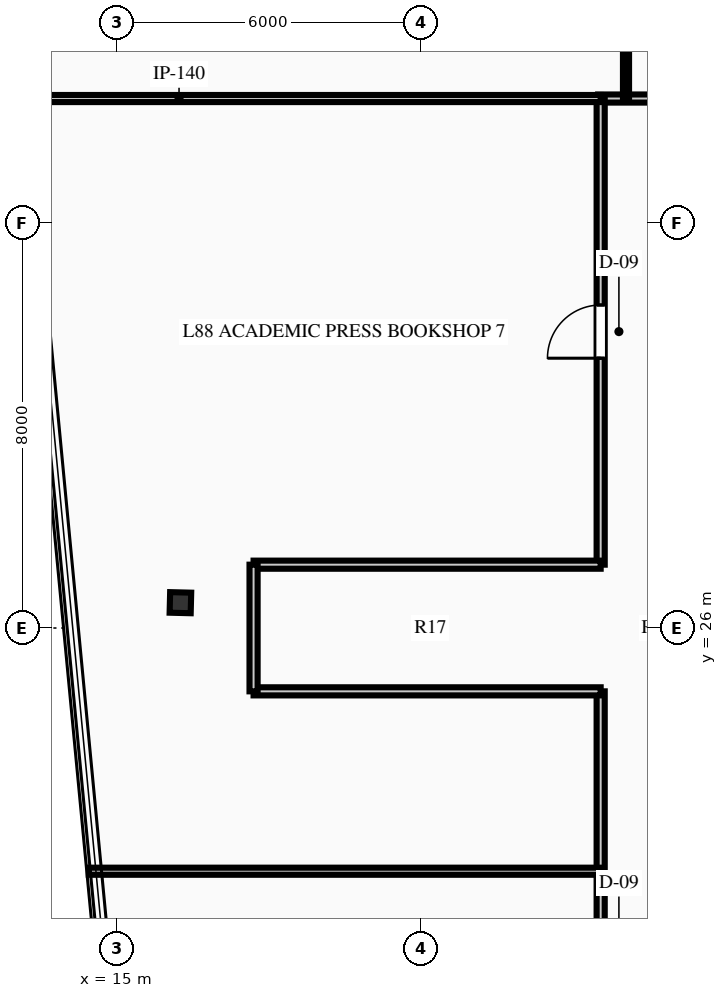
"""IFC4 building model, lengths in metres.
Left out: names, types, materials, properties, quantities, classifications, styles, units other than length and angle.
Written with IfcOpenShell. Run it as: python <this file> out.ifc"""

import sys

from ifc_helpers import new_model, si_unit, direction, frame, frame_2d, origin, origin_2d, place, context, subcontext, project, spatial, rectangle, i_section, extrude, element, fill, save


model = new_model("IFC4")
c1 = context("Model", 3, precision=1e-05, world=origin(), true_north=direction((0.0, 1.0)))
c2 = subcontext(c1, "Body", "Model", "MODEL_VIEW")
j1 = project(units=[si_unit("LENGTHUNIT", "METRE"), si_unit("PLANEANGLEUNIT", "RADIAN")], contexts=[c1])
p1 = place(None, origin())
s1 = spatial("IfcSite", under=j1, at=p1, CompositionType="ELEMENT")
p2 = place(p1, origin())
s2 = spatial("IfcBuilding", under=s1, at=p2, CompositionType="ELEMENT")
p3 = place(p2, frame((0.0, 0.0, 347.7)))
s3 = spatial("IfcBuildingStorey", under=s2, at=p3, CompositionType="ELEMENT", Elevation=347.7)
p4 = place(p3, frame((16.256, 26.5, 0.0), z_axis=(0.0, 0.0, 1.0), x_axis=(0.025304572866, 0.999679788028, 0.0)))
e1 = element("IfcColumn", 1, at=p4, inside=s3, PredefinedType="COLUMN", context=c2, shape_type="SweptSolid", body=[
    extrude(i_section(OverallWidth=0.406, OverallDepth=0.416, WebThickness=0.03, FlangeThickness=0.048, at=origin_2d()), origin(), (0.0, 0.0, 1.0), 4.5),
])
p5 = place(p3, frame((24.5, 36.45, 0.0), z_axis=(0.0, 0.0, 1.0), x_axis=(1.0, 0.0, 0.0)))
e2 = element("IfcWall", 2, at=p5, inside=s3, PredefinedType="PARTITIONING", context=c2, shape_type="SweptSolid", body=[
    extrude(rectangle(XDim=10.25, YDim=0.16, at=frame_2d((5.125, 0.0))), origin(), (0.0, 0.0, 1.0), 4.1),
])
p6 = place(p5, frame((1.25, 0.0, 0.0)))
e3 = element("IfcOpeningElement", 3, at=p6, cuts=e2, PredefinedType="OPENING", context=c2, shape_type="SweptSolid", body=[
    extrude(rectangle(XDim=0.9, YDim=2.15, at=frame_2d((0.45, 1.075))), frame((0.0, 0.09, 0.0), z_axis=(0.0, -1.0, 0.0), x_axis=(1.0, 0.0, 0.0)), (0.0, 0.0, 1.0), 0.18),
])
p7 = place(p5, frame((3.55, 0.0, 0.0)))
e4 = element("IfcOpeningElement", 4, at=p7, cuts=e2, PredefinedType="OPENING", context=c2, shape_type="SweptSolid", body=[
    extrude(rectangle(XDim=0.9, YDim=2.15, at=frame_2d((0.45, 1.075))), frame((0.0, 0.09, 0.0), z_axis=(0.0, -1.0, 0.0), x_axis=(1.0, 0.0, 0.0)), (0.0, 0.0, 1.0), 0.18),
])
p8 = place(p5, frame((5.8, 0.0, 0.0)))
e5 = element("IfcOpeningElement", 5, at=p8, cuts=e2, PredefinedType="OPENING", context=c2, shape_type="SweptSolid", body=[
    extrude(rectangle(XDim=1.0, YDim=2.15, at=frame_2d((0.5, 1.075))), frame((0.0, 0.09, 0.0), z_axis=(0.0, -1.0, 0.0), x_axis=(1.0, 0.0, 0.0)), (0.0, 0.0, 1.0), 0.18),
])
p9 = place(p3, frame((24.55, 15.55, 0.0), z_axis=(0.0, 0.0, 1.0), x_axis=(0.0, 1.0, 0.0)))
e6 = element("IfcWall", 6, at=p9, inside=s3, PredefinedType="PARTITIONING", context=c2, shape_type="SweptSolid", body=[
    extrude(rectangle(XDim=9.2, YDim=0.16, at=frame_2d((4.6, 0.0))), origin(), (0.0, 0.0, 1.0), 4.1),
])
p10 = place(p9, frame((3.543, 0.0, 0.0)))
e7 = element("IfcOpeningElement", 7, at=p10, cuts=e6, PredefinedType="OPENING", context=c2, shape_type="SweptSolid", body=[
    extrude(rectangle(XDim=1.05, YDim=2.15, at=frame_2d((0.525, 1.075))), frame((0.0, 0.09, 0.0), z_axis=(0.0, -1.0, 0.0), x_axis=(1.0, 0.0, 0.0)), (0.0, 0.0, 1.0), 0.18),
])
p11 = place(p3, frame((24.55, 27.25, 0.0), z_axis=(0.0, 0.0, 1.0), x_axis=(0.0, 1.0, 0.0)))
e8 = element("IfcWall", 8, at=p11, inside=s3, PredefinedType="PARTITIONING", context=c2, shape_type="SweptSolid", body=[
    extrude(rectangle(XDim=9.2, YDim=0.16, at=frame_2d((4.6, 0.0))), origin(), (0.0, 0.0, 1.0), 4.1),
])
p12 = place(p11, frame((4.075, 0.0, 0.0)))
e9 = element("IfcOpeningElement", 9, at=p12, cuts=e8, PredefinedType="OPENING", context=c2, shape_type="SweptSolid", body=[
    extrude(rectangle(XDim=1.05, YDim=2.15, at=frame_2d((0.525, 1.075))), frame((0.0, 0.09, 0.0), z_axis=(0.0, -1.0, 0.0), x_axis=(1.0, 0.0, 0.0)), (0.0, 0.0, 1.0), 0.18),
])
for number, where, z_axis, x_axis in (
    (10, (17.7, 24.75, 0.0), (0.0, 0.0, 1.0), (1.0, 0.0, 0.0)),
    (11, (17.7, 27.25, 0.0), (0.0, 0.0, 1.0), (1.0, 0.0, 0.0)),
):
    element("IfcWall", number, at=place(p3, frame(where, z_axis=z_axis, x_axis=x_axis)), inside=s3, PredefinedType="PARTITIONING", context=c2, shape_type="SweptSolid", body=[
        extrude(rectangle(XDim=6.85, YDim=0.16, at=frame_2d((3.425, 0.0))), origin(), (0.0, 0.0, 1.0), 4.1),
    ])
p13 = place(p3, frame((17.7, 24.75, 0.0), z_axis=(0.0, 0.0, 1.0), x_axis=(0.0, 1.0, 0.0)))
e12 = element("IfcWall", 12, at=p13, inside=s3, PredefinedType="PARTITIONING", context=c2, shape_type="SweptSolid", body=[
    extrude(rectangle(XDim=2.5, YDim=0.16, at=frame_2d((1.25, 0.0))), origin(), (0.0, 0.0, 1.0), 4.1),
])
p14 = place(p3, frame((25.05, 36.45, 0.0), z_axis=(0.0, 0.0, 1.0), x_axis=(0.0, 1.0, 0.0)))
e13 = element("IfcWall", 13, at=p14, inside=s3, PredefinedType="PARTITIONING", context=c2, shape_type="SweptSolid", body=[
    extrude(rectangle(XDim=3.9, YDim=0.12, at=frame_2d((1.95, 0.0))), origin(), (0.0, 0.0, 1.0), 4.1),
])
p15 = place(p3, frame((12.993, 36.45, 0.0), z_axis=(0.0, 0.0, 1.0), x_axis=(1.0, 0.0, 0.0)))
e14 = element("IfcWall", 14, at=p15, inside=s3, PredefinedType="PARTITIONING", context=c2, shape_type="SweptSolid", body=[
    extrude(rectangle(XDim=11.557, YDim=0.14, at=frame_2d((5.778, 0.0))), origin(), (0.0, 0.0, 1.0), 3.689),
])
p16 = place(p3, frame((14.448, 21.2, 0.0), z_axis=(0.0, 0.0, 1.0), x_axis=(1.0, 0.0, 0.0)))
e15 = element("IfcWall", 15, at=p16, inside=s3, PredefinedType="PARTITIONING", context=c2, shape_type="SweptSolid", body=[
    extrude(rectangle(XDim=10.102, YDim=0.14, at=frame_2d((5.051, 0.0))), origin(), (0.0, 0.0, 1.0), 4.1),
])
p17 = place(p12, origin())
e16 = element("IfcDoor", 16, at=p17, inside=s3, OperationType="SINGLE_SWING_LEFT", PredefinedType="DOOR", context=c2, shape_type="SweptSolid", body=[
    extrude(rectangle(XDim=1.05, YDim=2.15, at=frame_2d((0.525, 1.075))), frame((0.0, 0.025, 0.0), z_axis=(0.0, -1.0, 0.0), x_axis=(1.0, 0.0, 0.0)), (0.0, 0.0, 1.0), 0.05),
])
fill(e9, e16)
save(model, sys.argv[1])
